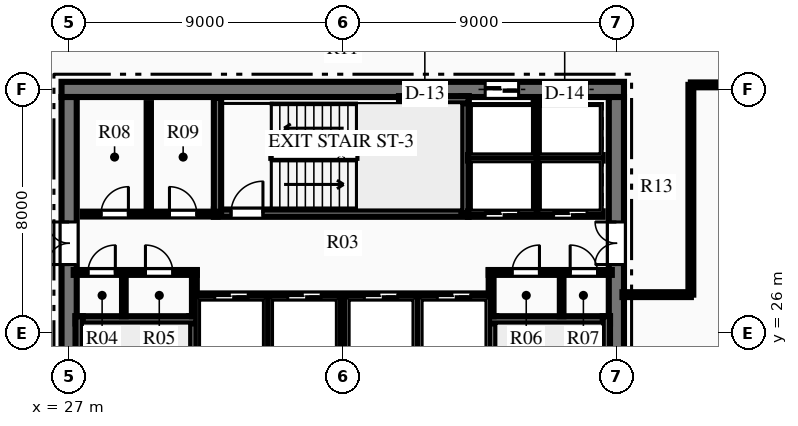
"""IFC4 building model, lengths in metres.
Left out: names, types, materials, properties, quantities, classifications, styles, units other than length and angle.
Written with IfcOpenShell. Run it as: python <this file> out.ifc"""

import sys

from ifc_helpers import new_model, si_unit, direction, frame, frame_2d, origin, place, context, subcontext, project, spatial, rectangle, extrude, element, fill, save


model = new_model("IFC4")
c1 = context("Model", 3, precision=1e-05, world=origin(), true_north=direction((0.0, 1.0)))
c2 = subcontext(c1, "Body", "Model", "MODEL_VIEW")
j1 = project(units=[si_unit("LENGTHUNIT", "METRE"), si_unit("PLANEANGLEUNIT", "RADIAN")], contexts=[c1])
p1 = place(None, origin())
s1 = spatial("IfcSite", under=j1, at=p1, CompositionType="ELEMENT")
p2 = place(p1, origin())
s2 = spatial("IfcBuilding", under=s1, at=p2, CompositionType="ELEMENT")
p3 = place(p2, frame((0.0, 0.0, 228.45)))
s3 = spatial("IfcBuildingStorey", under=s2, at=p3, CompositionType="ELEMENT", Elevation=228.45)
p4 = place(p3, frame((26.75, 34.0, 0.0), z_axis=(0.0, 0.0, 1.0), x_axis=(1.0, 0.0, 0.0)))
e1 = element("IfcWall", 1, at=p4, inside=s3, PredefinedType="SHEAR", context=c2, shape_type="SweptSolid", body=[
    extrude(rectangle(XDim=18.5, YDim=0.5, at=frame_2d((9.25, 0.0))), origin(), (0.0, 0.0, 1.0), 3.75),
])
p5 = place(p4, frame((13.935, 0.0, 0.0)))
e2 = element("IfcOpeningElement", 2, at=p5, cuts=e1, PredefinedType="OPENING", context=c2, shape_type="SweptSolid", body=[
    extrude(rectangle(XDim=1.1, YDim=2.15, at=frame_2d((0.55, 1.075))), frame((0.0, 0.26, 0.0), z_axis=(0.0, -1.0, 0.0), x_axis=(1.0, 0.0, 0.0)), (0.0, 0.0, 1.0), 0.52),
])
p6 = place(p4, frame((16.185, 0.0, 0.0)))
e3 = element("IfcOpeningElement", 3, at=p6, cuts=e1, PredefinedType="OPENING", context=c2, shape_type="SweptSolid", body=[
    extrude(rectangle(XDim=1.1, YDim=2.15, at=frame_2d((0.55, 1.075))), frame((0.0, 0.26, 0.0), z_axis=(0.0, -1.0, 0.0), x_axis=(1.0, 0.0, 0.0)), (0.0, 0.0, 1.0), 0.52),
])
p7 = place(p3, frame((27.0, 18.25, 0.0), z_axis=(0.0, 0.0, 1.0), x_axis=(0.0, 1.0, 0.0)))
e4 = element("IfcWall", 4, at=p7, inside=s3, PredefinedType="SHEAR", context=c2, shape_type="SweptSolid", body=[
    extrude(rectangle(XDim=15.5, YDim=0.5, at=frame_2d((7.75, 0.0))), origin(), (0.0, 0.0, 1.0), 3.75),
])
p8 = place(p7, frame((9.99, 0.0, 0.0)))
e5 = element("IfcOpeningElement", 5, at=p8, cuts=e4, PredefinedType="OPENING", context=c2, shape_type="SweptSolid", body=[
    extrude(rectangle(XDim=1.4, YDim=2.2, at=frame_2d((0.7, 1.1))), frame((0.0, 0.26, 0.0), z_axis=(0.0, -1.0, 0.0), x_axis=(1.0, 0.0, 0.0)), (0.0, 0.0, 1.0), 0.52),
])
p9 = place(p3, frame((45.0, 18.25, 0.0), z_axis=(0.0, 0.0, 1.0), x_axis=(0.0, 1.0, 0.0)))
e6 = element("IfcWall", 6, at=p9, inside=s3, PredefinedType="SHEAR", context=c2, shape_type="SweptSolid", body=[
    extrude(rectangle(XDim=15.5, YDim=0.5, at=frame_2d((7.75, 0.0))), origin(), (0.0, 0.0, 1.0), 3.75),
])
p10 = place(p9, frame((9.99, 0.0, 0.0)))
e7 = element("IfcOpeningElement", 7, at=p10, cuts=e6, PredefinedType="OPENING", context=c2, shape_type="SweptSolid", body=[
    extrude(rectangle(XDim=1.4, YDim=2.2, at=frame_2d((0.7, 1.1))), frame((0.0, 0.26, 0.0), z_axis=(0.0, -1.0, 0.0), x_axis=(1.0, 0.0, 0.0)), (0.0, 0.0, 1.0), 0.52),
])
p11 = place(p3, frame((31.07, 18.28, 0.0), z_axis=(0.0, 0.0, 1.0), x_axis=(0.0, 1.0, 0.0)))
e8 = element("IfcWall", 8, at=p11, inside=s3, PredefinedType="SHEAR", context=c2, shape_type="SweptSolid", body=[
    extrude(rectangle(XDim=8.26, YDim=0.24, at=frame_2d((4.13, 0.0))), origin(), (0.0, 0.0, 1.0), 3.75),
])
p12 = place(p11, frame((0.365, 0.0, 0.0)))
e9 = element("IfcOpeningElement", 9, at=p12, cuts=e8, PredefinedType="OPENING", context=c2, shape_type="SweptSolid", body=[
    extrude(rectangle(XDim=1.05, YDim=2.15, at=frame_2d((0.525, 1.075))), frame((0.0, 0.13, 0.0), z_axis=(0.0, -1.0, 0.0), x_axis=(1.0, 0.0, 0.0)), (0.0, 0.0, 1.0), 0.26),
])
p13 = place(p3, frame((27.21, 26.42, 0.0), z_axis=(0.0, 0.0, 1.0), x_axis=(1.0, 0.0, 0.0)))
e10 = element("IfcWall", 10, at=p13, inside=s3, PredefinedType="SHEAR", context=c2, shape_type="SweptSolid", body=[
    extrude(rectangle(XDim=3.98, YDim=0.24, at=frame_2d((1.99, 0.0))), origin(), (0.0, 0.0, 1.0), 3.75),
])
p14 = place(p3, frame((27.33, 18.28, 0.0), z_axis=(0.0, 0.0, 1.0), x_axis=(0.0, 1.0, 0.0)))
e11 = element("IfcWall", 11, at=p14, inside=s3, PredefinedType="SHEAR", context=c2, shape_type="SweptSolid", body=[
    extrude(rectangle(XDim=8.26, YDim=0.24, at=frame_2d((4.13, 0.0))), origin(), (0.0, 0.0, 1.0), 3.75),
])
p15 = place(p3, frame((40.93, 18.28, 0.0), z_axis=(0.0, 0.0, 1.0), x_axis=(0.0, 1.0, 0.0)))
e12 = element("IfcWall", 12, at=p15, inside=s3, PredefinedType="SHEAR", context=c2, shape_type="SweptSolid", body=[
    extrude(rectangle(XDim=8.26, YDim=0.24, at=frame_2d((4.13, 0.0))), origin(), (0.0, 0.0, 1.0), 3.75),
])
p16 = place(p15, frame((0.365, 0.0, 0.0)))
e13 = element("IfcOpeningElement", 13, at=p16, cuts=e12, PredefinedType="OPENING", context=c2, shape_type="SweptSolid", body=[
    extrude(rectangle(XDim=1.05, YDim=2.15, at=frame_2d((0.525, 1.075))), frame((0.0, 0.13, 0.0), z_axis=(0.0, -1.0, 0.0), x_axis=(1.0, 0.0, 0.0)), (0.0, 0.0, 1.0), 0.26),
])
p17 = place(p3, frame((40.81, 26.42, 0.0), z_axis=(0.0, 0.0, 1.0), x_axis=(1.0, 0.0, 0.0)))
e14 = element("IfcWall", 14, at=p17, inside=s3, PredefinedType="SHEAR", context=c2, shape_type="SweptSolid", body=[
    extrude(rectangle(XDim=3.98, YDim=0.24, at=frame_2d((1.99, 0.0))), origin(), (0.0, 0.0, 1.0), 3.75),
])
p18 = place(p3, frame((44.67, 18.28, 0.0), z_axis=(0.0, 0.0, 1.0), x_axis=(0.0, 1.0, 0.0)))
e15 = element("IfcWall", 15, at=p18, inside=s3, PredefinedType="SHEAR", context=c2, shape_type="SweptSolid", body=[
    extrude(rectangle(XDim=8.26, YDim=0.24, at=frame_2d((4.13, 0.0))), origin(), (0.0, 0.0, 1.0), 3.75),
])
p19 = place(p3, frame((31.76, 29.93, 0.0), z_axis=(0.0, 0.0, 1.0), x_axis=(1.0, 0.0, 0.0)))
e16 = element("IfcWall", 16, at=p19, inside=s3, PredefinedType="SHEAR", context=c2, shape_type="SweptSolid", body=[
    extrude(rectangle(XDim=8.38, YDim=0.24, at=frame_2d((4.19, 0.0))), origin(), (0.0, 0.0, 1.0), 3.75),
])
p20 = place(p19, frame((0.565, 0.0, 0.0)))
e17 = element("IfcOpeningElement", 17, at=p20, cuts=e16, PredefinedType="OPENING", context=c2, shape_type="SweptSolid", body=[
    extrude(rectangle(XDim=1.05, YDim=2.15, at=frame_2d((0.525, 1.075))), frame((0.0, 0.13, 0.0), z_axis=(0.0, -1.0, 0.0), x_axis=(1.0, 0.0, 0.0)), (0.0, 0.0, 1.0), 0.26),
])
p21 = place(p3, frame((31.88, 29.93, 0.0), z_axis=(0.0, 0.0, 1.0), x_axis=(0.0, 1.0, 0.0)))
e18 = element("IfcWall", 18, at=p21, inside=s3, PredefinedType="SHEAR", context=c2, shape_type="SweptSolid", body=[
    extrude(rectangle(XDim=3.79, YDim=0.24, at=frame_2d((1.895, 0.0))), origin(), (0.0, 0.0, 1.0), 3.75),
])
p22 = place(p3, frame((40.02, 29.93, 0.0), z_axis=(0.0, 0.0, 1.0), x_axis=(0.0, 1.0, 0.0)))
e19 = element("IfcWall", 19, at=p22, inside=s3, PredefinedType="SHEAR", context=c2, shape_type="SweptSolid", body=[
    extrude(rectangle(XDim=3.85, YDim=0.24, at=frame_2d((1.925, 0.0))), origin(), (0.0, 0.0, 1.0), 3.75),
])
p23 = place(p3, frame((37.85, 33.66, 0.0), z_axis=(0.0, 0.0, 1.0), x_axis=(1.0, 0.0, 0.0)))
e20 = element("IfcWall", 20, at=p23, inside=s3, PredefinedType="SHEAR", context=c2, shape_type="SweptSolid", body=[
    extrude(rectangle(XDim=2.29, YDim=0.24, at=frame_2d((1.145, 0.0))), origin(), (0.0, 0.0, 1.0), 3.75),
])
p24 = place(p3, frame((27.15, 27.98, 0.0), z_axis=(0.0, 0.0, 1.0), x_axis=(1.0, 0.0, 0.0)))
e21 = element("IfcWall", 21, at=p24, inside=s3, PredefinedType="PARTITIONING", context=c2, shape_type="SweptSolid", body=[
    extrude(rectangle(XDim=4.05, YDim=0.16, at=frame_2d((2.025, 0.0))), origin(), (0.0, 0.0, 1.0), 3.47),
])
p25 = place(p24, frame((0.47, 0.0, 0.0)))
e22 = element("IfcOpeningElement", 22, at=p25, cuts=e21, PredefinedType="OPENING", context=c2, shape_type="SweptSolid", body=[
    extrude(rectangle(XDim=0.9, YDim=2.15, at=frame_2d((0.45, 1.075))), frame((0.0, 0.09, 0.0), z_axis=(0.0, -1.0, 0.0), x_axis=(1.0, 0.0, 0.0)), (0.0, 0.0, 1.0), 0.18),
])
p26 = place(p24, frame((2.36, 0.0, 0.0)))
e23 = element("IfcOpeningElement", 23, at=p26, cuts=e21, PredefinedType="OPENING", context=c2, shape_type="SweptSolid", body=[
    extrude(rectangle(XDim=0.9, YDim=2.15, at=frame_2d((0.45, 1.075))), frame((0.0, 0.09, 0.0), z_axis=(0.0, -1.0, 0.0), x_axis=(1.0, 0.0, 0.0)), (0.0, 0.0, 1.0), 0.18),
])
p27 = place(p3, frame((31.12, 26.54, 0.0), z_axis=(0.0, 0.0, 1.0), x_axis=(0.0, 1.0, 0.0)))
e24 = element("IfcWall", 24, at=p27, inside=s3, PredefinedType="PARTITIONING", context=c2, shape_type="SweptSolid", body=[
    extrude(rectangle(XDim=1.51, YDim=0.16, at=frame_2d((0.755, 0.0))), origin(), (0.0, 0.0, 1.0), 3.47),
])
p28 = place(p3, frame((40.8, 27.98, 0.0), z_axis=(0.0, 0.0, 1.0), x_axis=(1.0, 0.0, 0.0)))
e25 = element("IfcWall", 25, at=p28, inside=s3, PredefinedType="PARTITIONING", context=c2, shape_type="SweptSolid", body=[
    extrude(rectangle(XDim=4.05, YDim=0.16, at=frame_2d((2.025, 0.0))), origin(), (0.0, 0.0, 1.0), 3.47),
])
p29 = place(p28, frame((0.77, 0.0, 0.0)))
e26 = element("IfcOpeningElement", 26, at=p29, cuts=e25, PredefinedType="OPENING", context=c2, shape_type="SweptSolid", body=[
    extrude(rectangle(XDim=0.9, YDim=2.15, at=frame_2d((0.45, 1.075))), frame((0.0, 0.09, 0.0), z_axis=(0.0, -1.0, 0.0), x_axis=(1.0, 0.0, 0.0)), (0.0, 0.0, 1.0), 0.18),
])
p30 = place(p28, frame((2.68, 0.0, 0.0)))
e27 = element("IfcOpeningElement", 27, at=p30, cuts=e25, PredefinedType="OPENING", context=c2, shape_type="SweptSolid", body=[
    extrude(rectangle(XDim=0.9, YDim=2.15, at=frame_2d((0.45, 1.075))), frame((0.0, 0.09, 0.0), z_axis=(0.0, -1.0, 0.0), x_axis=(1.0, 0.0, 0.0)), (0.0, 0.0, 1.0), 0.18),
])
p31 = place(p3, frame((40.88, 26.54, 0.0), z_axis=(0.0, 0.0, 1.0), x_axis=(0.0, 1.0, 0.0)))
e28 = element("IfcWall", 28, at=p31, inside=s3, PredefinedType="PARTITIONING", context=c2, shape_type="SweptSolid", body=[
    extrude(rectangle(XDim=1.51, YDim=0.16, at=frame_2d((0.755, 0.0))), origin(), (0.0, 0.0, 1.0), 3.47),
])
for number, where, z_axis, x_axis in (
    (29, (28.8, 26.54, 0.0), (0.0, 0.0, 1.0), (0.0, 1.0, 0.0)),
    (30, (43.2, 26.54, 0.0), (0.0, 0.0, 1.0), (0.0, 1.0, 0.0)),
):
    element("IfcWall", number, at=place(p3, frame(where, z_axis=z_axis, x_axis=x_axis)), inside=s3, PredefinedType="PARTITIONING", context=c2, shape_type="SweptSolid", body=[
        extrude(rectangle(XDim=1.44, YDim=0.12, at=frame_2d((0.72, 0.0))), origin(), (0.0, 0.0, 1.0), 3.47),
    ])
p32 = place(p3, frame((27.45, 29.9, 0.0), z_axis=(0.0, 0.0, 1.0), x_axis=(1.0, 0.0, 0.0)))
e31 = element("IfcWall", 31, at=p32, inside=s3, PredefinedType="PARTITIONING", context=c2, shape_type="SweptSolid", body=[
    extrude(rectangle(XDim=4.43, YDim=0.16, at=frame_2d((2.215, 0.0))), origin(), (0.0, 0.0, 1.0), 3.47),
])
p33 = place(p32, frame((0.6, 0.0, 0.0)))
e32 = element("IfcOpeningElement", 32, at=p33, cuts=e31, PredefinedType="OPENING", context=c2, shape_type="SweptSolid", body=[
    extrude(rectangle(XDim=0.9, YDim=2.15, at=frame_2d((0.45, 1.075))), frame((0.0, 0.09, 0.0), z_axis=(0.0, -1.0, 0.0), x_axis=(1.0, 0.0, 0.0)), (0.0, 0.0, 1.0), 0.18),
])
p34 = place(p32, frame((2.85, 0.0, 0.0)))
e33 = element("IfcOpeningElement", 33, at=p34, cuts=e31, PredefinedType="OPENING", context=c2, shape_type="SweptSolid", body=[
    extrude(rectangle(XDim=0.9, YDim=2.15, at=frame_2d((0.45, 1.075))), frame((0.0, 0.09, 0.0), z_axis=(0.0, -1.0, 0.0), x_axis=(1.0, 0.0, 0.0)), (0.0, 0.0, 1.0), 0.18),
])
p35 = place(p3, frame((29.62, 29.95, 0.0), z_axis=(0.0, 0.0, 1.0), x_axis=(0.0, 1.0, 0.0)))
e34 = element("IfcWall", 34, at=p35, inside=s3, PredefinedType="PARTITIONING", context=c2, shape_type="SweptSolid", body=[
    extrude(rectangle(XDim=3.6, YDim=0.14, at=frame_2d((1.8, 0.0))), origin(), (0.0, 0.0, 1.0), 3.47),
])
p36 = place(p3, frame((40.12, 29.9, 0.0), z_axis=(0.0, 0.0, 1.0), x_axis=(1.0, 0.0, 0.0)))
e35 = element("IfcWall", 35, at=p36, inside=s3, PredefinedType="PARTITIONING", context=c2, shape_type="SweptSolid", body=[
    extrude(rectangle(XDim=4.43, YDim=0.18, at=frame_2d((2.215, 0.0))), origin(), (0.0, 0.0, 1.0), 3.47),
])
p37 = place(p36, frame((0.565, 0.0, 0.0)))
e36 = element("IfcOpeningElement", 36, at=p37, cuts=e35, PredefinedType="OPENING", context=c2, shape_type="SweptSolid", body=[
    extrude(rectangle(XDim=1.1, YDim=2.15, at=frame_2d((0.55, 1.075))), frame((0.0, 0.1, 0.0), z_axis=(0.0, -1.0, 0.0), x_axis=(1.0, 0.0, 0.0)), (0.0, 0.0, 1.0), 0.2),
])
p38 = place(p36, frame((2.815, 0.0, 0.0)))
e37 = element("IfcOpeningElement", 37, at=p38, cuts=e35, PredefinedType="OPENING", context=c2, shape_type="SweptSolid", body=[
    extrude(rectangle(XDim=1.1, YDim=2.15, at=frame_2d((0.55, 1.075))), frame((0.0, 0.1, 0.0), z_axis=(0.0, -1.0, 0.0), x_axis=(1.0, 0.0, 0.0)), (0.0, 0.0, 1.0), 0.2),
])
p39 = place(p3, frame((40.12, 31.75, 0.0), z_axis=(0.0, 0.0, 1.0), x_axis=(1.0, 0.0, 0.0)))
e38 = element("IfcWall", 38, at=p39, inside=s3, PredefinedType="PARTITIONING", context=c2, shape_type="SweptSolid", body=[
    extrude(rectangle(XDim=4.43, YDim=0.18, at=frame_2d((2.215, 0.0))), origin(), (0.0, 0.0, 1.0), 3.47),
])
p40 = place(p3, frame((42.37, 29.9, 0.0), z_axis=(0.0, 0.0, 1.0), x_axis=(0.0, 1.0, 0.0)))
e39 = element("IfcWall", 39, at=p40, inside=s3, PredefinedType="PARTITIONING", context=c2, shape_type="SweptSolid", body=[
    extrude(rectangle(XDim=3.75, YDim=0.18, at=frame_2d((1.875, 0.0))), origin(), (0.0, 0.0, 1.0), 3.47),
])
p41 = place(p3, frame((31.2, 27.2, 0.0), z_axis=(0.0, 0.0, 1.0), x_axis=(1.0, 0.0, 0.0)))
e40 = element("IfcWall", 40, at=p41, inside=s3, PredefinedType="PARTITIONING", context=c2, shape_type="SweptSolid", body=[
    extrude(rectangle(XDim=9.6, YDim=0.18, at=frame_2d((4.8, 0.0))), origin(), (0.0, 0.0, 1.0), 3.47),
])
p42 = place(p41, frame((0.59, 0.0, 0.0)))
e41 = element("IfcOpeningElement", 41, at=p42, cuts=e40, PredefinedType="OPENING", context=c2, shape_type="SweptSolid", body=[
    extrude(rectangle(XDim=1.1, YDim=2.15, at=frame_2d((0.55, 1.075))), frame((0.0, 0.1, 0.0), z_axis=(0.0, -1.0, 0.0), x_axis=(1.0, 0.0, 0.0)), (0.0, 0.0, 1.0), 0.2),
])
p43 = place(p41, frame((2.99, 0.0, 0.0)))
e42 = element("IfcOpeningElement", 42, at=p43, cuts=e40, PredefinedType="OPENING", context=c2, shape_type="SweptSolid", body=[
    extrude(rectangle(XDim=1.1, YDim=2.15, at=frame_2d((0.55, 1.075))), frame((0.0, 0.1, 0.0), z_axis=(0.0, -1.0, 0.0), x_axis=(1.0, 0.0, 0.0)), (0.0, 0.0, 1.0), 0.2),
])
p44 = place(p41, frame((5.51, 0.0, 0.0)))
e43 = element("IfcOpeningElement", 43, at=p44, cuts=e40, PredefinedType="OPENING", context=c2, shape_type="SweptSolid", body=[
    extrude(rectangle(XDim=1.1, YDim=2.15, at=frame_2d((0.55, 1.075))), frame((0.0, 0.1, 0.0), z_axis=(0.0, -1.0, 0.0), x_axis=(1.0, 0.0, 0.0)), (0.0, 0.0, 1.0), 0.2),
])
p45 = place(p41, frame((7.91, 0.0, 0.0)))
e44 = element("IfcOpeningElement", 44, at=p45, cuts=e40, PredefinedType="OPENING", context=c2, shape_type="SweptSolid", body=[
    extrude(rectangle(XDim=1.1, YDim=2.15, at=frame_2d((0.55, 1.075))), frame((0.0, 0.1, 0.0), z_axis=(0.0, -1.0, 0.0), x_axis=(1.0, 0.0, 0.0)), (0.0, 0.0, 1.0), 0.2),
])
for number, where, z_axis, x_axis in (
    (45, (33.54, 25.3, 0.0), (0.0, 0.0, 1.0), (0.0, 1.0, 0.0)),
    (46, (36.0, 25.3, 0.0), (0.0, 0.0, 1.0), (0.0, 1.0, 0.0)),
    (47, (38.46, 25.3, 0.0), (0.0, 0.0, 1.0), (0.0, 1.0, 0.0)),
):
    element("IfcWall", number, at=place(p3, frame(where, z_axis=z_axis, x_axis=x_axis)), inside=s3, PredefinedType="PARTITIONING", context=c2, shape_type="SweptSolid", body=[
        extrude(rectangle(XDim=1.9, YDim=0.18, at=frame_2d((0.95, 0.0))), origin(), (0.0, 0.0, 1.0), 3.47),
    ])
p46 = place(p3, frame((47.45, 34.15, 0.0), z_axis=(0.0, 0.0, 1.0), x_axis=(1.0, 0.0, 0.0)))
e48 = element("IfcWall", 48, at=p46, inside=s3, PredefinedType="PARTITIONING", context=c2, shape_type="SweptSolid", body=[
    extrude(rectangle(XDim=6.35, YDim=0.16, at=frame_2d((3.175, 0.0))), origin(), (0.0, 0.0, 1.0), 3.47),
])
p47 = place(p3, frame((47.45, 27.25, 0.0), z_axis=(0.0, 0.0, 1.0), x_axis=(0.0, 1.0, 0.0)))
e49 = element("IfcWall", 49, at=p47, inside=s3, PredefinedType="PARTITIONING", context=c2, shape_type="SweptSolid", body=[
    extrude(rectangle(XDim=6.9, YDim=0.16, at=frame_2d((3.45, 0.0))), origin(), (0.0, 0.0, 1.0), 3.47),
])
p48 = place(p3, frame((45.2, 27.25, 0.0), z_axis=(0.0, 0.0, 1.0), x_axis=(1.0, 0.0, 0.0)))
e50 = element("IfcWall", 50, at=p48, inside=s3, PredefinedType="PARTITIONING", context=c2, shape_type="SweptSolid", body=[
    extrude(rectangle(XDim=2.25, YDim=0.16, at=frame_2d((1.125, 0.0))), origin(), (0.0, 0.0, 1.0), 3.47),
])
p49 = place(p25, origin())
e51 = element("IfcDoor", 51, at=p49, inside=s3, OperationType="SINGLE_SWING_RIGHT", PredefinedType="DOOR", context=c2, shape_type="SweptSolid", body=[
    extrude(rectangle(XDim=0.9, YDim=2.15, at=frame_2d((0.45, 1.075))), frame((0.0, 0.025, 0.0), z_axis=(0.0, -1.0, 0.0), x_axis=(1.0, 0.0, 0.0)), (0.0, 0.0, 1.0), 0.05),
])
fill(e22, e51)
p50 = place(p26, origin())
e52 = element("IfcDoor", 52, at=p50, inside=s3, OperationType="SINGLE_SWING_LEFT", PredefinedType="DOOR", context=c2, shape_type="SweptSolid", body=[
    extrude(rectangle(XDim=0.9, YDim=2.15, at=frame_2d((0.45, 1.075))), frame((0.0, 0.025, 0.0), z_axis=(0.0, -1.0, 0.0), x_axis=(1.0, 0.0, 0.0)), (0.0, 0.0, 1.0), 0.05),
])
fill(e23, e52)
p51 = place(p29, origin())
e53 = element("IfcDoor", 53, at=p51, inside=s3, OperationType="SINGLE_SWING_RIGHT", PredefinedType="DOOR", context=c2, shape_type="SweptSolid", body=[
    extrude(rectangle(XDim=0.9, YDim=2.15, at=frame_2d((0.45, 1.075))), frame((0.0, 0.025, 0.0), z_axis=(0.0, -1.0, 0.0), x_axis=(1.0, 0.0, 0.0)), (0.0, 0.0, 1.0), 0.05),
])
fill(e26, e53)
p52 = place(p30, origin())
e54 = element("IfcDoor", 54, at=p52, inside=s3, OperationType="SINGLE_SWING_LEFT", PredefinedType="DOOR", context=c2, shape_type="SweptSolid", body=[
    extrude(rectangle(XDim=0.9, YDim=2.15, at=frame_2d((0.45, 1.075))), frame((0.0, 0.025, 0.0), z_axis=(0.0, -1.0, 0.0), x_axis=(1.0, 0.0, 0.0)), (0.0, 0.0, 1.0), 0.05),
])
fill(e27, e54)
p53 = place(p33, origin())
e55 = element("IfcDoor", 55, at=p53, inside=s3, OperationType="SINGLE_SWING_RIGHT", PredefinedType="DOOR", context=c2, shape_type="SweptSolid", body=[
    extrude(rectangle(XDim=0.9, YDim=2.15, at=frame_2d((0.45, 1.075))), frame((0.0, 0.025, 0.0), z_axis=(0.0, -1.0, 0.0), x_axis=(1.0, 0.0, 0.0)), (0.0, 0.0, 1.0), 0.05),
])
fill(e32, e55)
p54 = place(p34, origin())
e56 = element("IfcDoor", 56, at=p54, inside=s3, OperationType="SINGLE_SWING_LEFT", PredefinedType="DOOR", context=c2, shape_type="SweptSolid", body=[
    extrude(rectangle(XDim=0.9, YDim=2.15, at=frame_2d((0.45, 1.075))), frame((0.0, 0.025, 0.0), z_axis=(0.0, -1.0, 0.0), x_axis=(1.0, 0.0, 0.0)), (0.0, 0.0, 1.0), 0.05),
])
fill(e33, e56)
p55 = place(p20, origin())
e57 = element("IfcDoor", 57, at=p55, inside=s3, OperationType="SINGLE_SWING_RIGHT", PredefinedType="DOOR", context=c2, shape_type="SweptSolid", body=[
    extrude(rectangle(XDim=1.05, YDim=2.15, at=frame_2d((0.525, 1.075))), frame((0.0, 0.025, 0.0), z_axis=(0.0, -1.0, 0.0), x_axis=(1.0, 0.0, 0.0)), (0.0, 0.0, 1.0), 0.05),
])
fill(e17, e57)
p56 = place(p8, origin())
e58 = element("IfcDoor", 58, at=p56, inside=s3, OperationType="DOUBLE_DOOR_SINGLE_SWING", PredefinedType="DOOR", context=c2, shape_type="SweptSolid", body=[
    extrude(rectangle(XDim=1.4, YDim=2.2, at=frame_2d((0.7, 1.1))), frame((0.0, 0.025, 0.0), z_axis=(0.0, -1.0, 0.0), x_axis=(1.0, 0.0, 0.0)), (0.0, 0.0, 1.0), 0.05),
])
fill(e5, e58)
p57 = place(p10, origin())
e59 = element("IfcDoor", 59, at=p57, inside=s3, OperationType="DOUBLE_DOOR_SINGLE_SWING", PredefinedType="DOOR", context=c2, shape_type="SweptSolid", body=[
    extrude(rectangle(XDim=1.4, YDim=2.2, at=frame_2d((0.7, 1.1))), frame((0.0, 0.025, 0.0), z_axis=(0.0, -1.0, 0.0), x_axis=(1.0, 0.0, 0.0)), (0.0, 0.0, 1.0), 0.05),
])
fill(e7, e59)
p58 = place(p37, origin())
e60 = element("IfcDoor", 60, at=p58, inside=s3, OperationType="SLIDING_TO_LEFT", PredefinedType="DOOR", context=c2, shape_type="SweptSolid", body=[
    extrude(rectangle(XDim=1.1, YDim=2.15, at=frame_2d((0.55, 1.075))), frame((0.0, 0.025, 0.0), z_axis=(0.0, -1.0, 0.0), x_axis=(1.0, 0.0, 0.0)), (0.0, 0.0, 1.0), 0.05),
])
fill(e36, e60)
p59 = place(p38, origin())
e61 = element("IfcDoor", 61, at=p59, inside=s3, OperationType="SLIDING_TO_LEFT", PredefinedType="DOOR", context=c2, shape_type="SweptSolid", body=[
    extrude(rectangle(XDim=1.1, YDim=2.15, at=frame_2d((0.55, 1.075))), frame((0.0, 0.025, 0.0), z_axis=(0.0, -1.0, 0.0), x_axis=(1.0, 0.0, 0.0)), (0.0, 0.0, 1.0), 0.05),
])
fill(e37, e61)
p60 = place(p5, origin())
e62 = element("IfcDoor", 62, at=p60, inside=s3, OperationType="SLIDING_TO_LEFT", PredefinedType="DOOR", context=c2, shape_type="SweptSolid", body=[
    extrude(rectangle(XDim=1.1, YDim=2.15, at=frame_2d((0.55, 1.075))), frame((0.0, 0.025, 0.0), z_axis=(0.0, -1.0, 0.0), x_axis=(1.0, 0.0, 0.0)), (0.0, 0.0, 1.0), 0.05),
])
fill(e2, e62)
p61 = place(p6, origin())
e63 = element("IfcDoor", 63, at=p61, inside=s3, OperationType="SLIDING_TO_LEFT", PredefinedType="DOOR", context=c2, shape_type="SweptSolid", body=[
    extrude(rectangle(XDim=1.1, YDim=2.15, at=frame_2d((0.55, 1.075))), frame((0.0, 0.025, 0.0), z_axis=(0.0, -1.0, 0.0), x_axis=(1.0, 0.0, 0.0)), (0.0, 0.0, 1.0), 0.05),
])
fill(e3, e63)
p62 = place(p42, origin())
e64 = element("IfcDoor", 64, at=p62, inside=s3, OperationType="SLIDING_TO_LEFT", PredefinedType="DOOR", context=c2, shape_type="SweptSolid", body=[
    extrude(rectangle(XDim=1.1, YDim=2.15, at=frame_2d((0.55, 1.075))), frame((0.0, 0.025, 0.0), z_axis=(0.0, -1.0, 0.0), x_axis=(1.0, 0.0, 0.0)), (0.0, 0.0, 1.0), 0.05),
])
fill(e41, e64)
p63 = place(p43, origin())
e65 = element("IfcDoor", 65, at=p63, inside=s3, OperationType="SLIDING_TO_LEFT", PredefinedType="DOOR", context=c2, shape_type="SweptSolid", body=[
    extrude(rectangle(XDim=1.1, YDim=2.15, at=frame_2d((0.55, 1.075))), frame((0.0, 0.025, 0.0), z_axis=(0.0, -1.0, 0.0), x_axis=(1.0, 0.0, 0.0)), (0.0, 0.0, 1.0), 0.05),
])
fill(e42, e65)
p64 = place(p44, origin())
e66 = element("IfcDoor", 66, at=p64, inside=s3, OperationType="SLIDING_TO_LEFT", PredefinedType="DOOR", context=c2, shape_type="SweptSolid", body=[
    extrude(rectangle(XDim=1.1, YDim=2.15, at=frame_2d((0.55, 1.075))), frame((0.0, 0.025, 0.0), z_axis=(0.0, -1.0, 0.0), x_axis=(1.0, 0.0, 0.0)), (0.0, 0.0, 1.0), 0.05),
])
fill(e43, e66)
p65 = place(p45, origin())
e67 = element("IfcDoor", 67, at=p65, inside=s3, OperationType="SLIDING_TO_LEFT", PredefinedType="DOOR", context=c2, shape_type="SweptSolid", body=[
    extrude(rectangle(XDim=1.1, YDim=2.15, at=frame_2d((0.55, 1.075))), frame((0.0, 0.025, 0.0), z_axis=(0.0, -1.0, 0.0), x_axis=(1.0, 0.0, 0.0)), (0.0, 0.0, 1.0), 0.05),
])
fill(e44, e67)
save(model, sys.argv[1])
